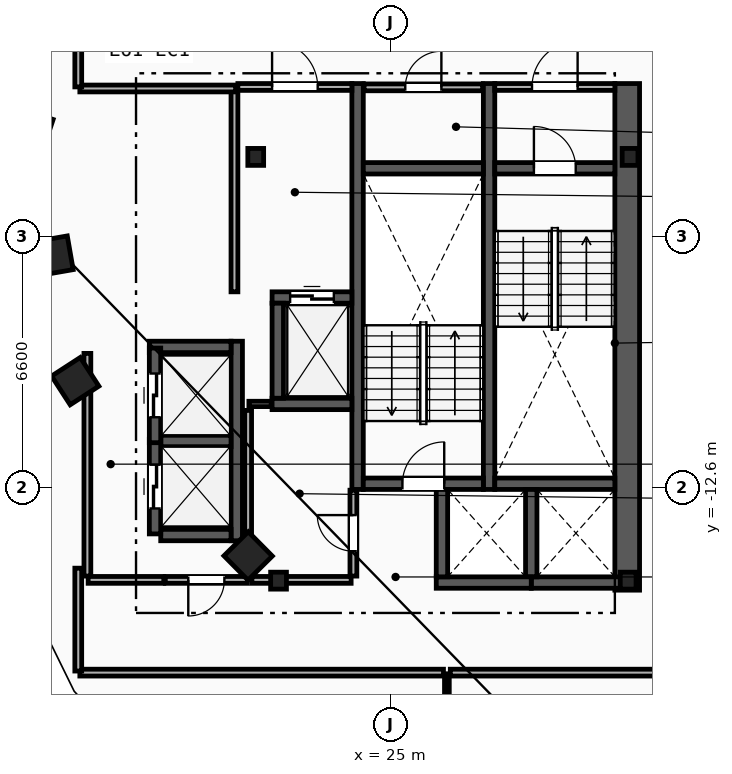
"""IFC4 building model, lengths in metres.
Left out: names, types, materials, properties, quantities, classifications, styles, units other than length and angle.
Written with IfcOpenShell. Run it as: python <this file> out.ifc"""

import sys

from ifc_helpers import new_model, si_unit, direction, frame, frame_2d, origin, origin_2d, place, context, subcontext, project, spatial, rectangle, i_section, extrude, element, fill, save


model = new_model("IFC4")
c1 = context("Model", 3, precision=1e-05, world=origin(), true_north=direction((0.0, 1.0)))
c2 = subcontext(c1, "Body", "Model", "MODEL_VIEW")
j1 = project(units=[si_unit("LENGTHUNIT", "METRE"), si_unit("PLANEANGLEUNIT", "RADIAN")], contexts=[c1])
p1 = place(None, origin())
s1 = spatial("IfcSite", under=j1, at=p1, CompositionType="ELEMENT")
p2 = place(p1, origin())
s2 = spatial("IfcBuilding", under=s1, at=p2, CompositionType="ELEMENT")
p3 = place(p2, frame((0.0, 0.0, 231.4)))
s3 = spatial("IfcBuildingStorey", under=s2, at=p3, CompositionType="ELEMENT", Elevation=231.4)
for number, where, z_axis, x_axis in (
    (1, (31.3, -3.9, 0.0), (0.0, 0.0, 1.0), (1.0, 0.0, 0.0)),
    (2, (21.45, -3.9, 0.0), (0.0, 0.0, 1.0), (1.0, 0.0, 0.0)),
    (3, (22.05, -15.05, 0.0), (0.0, 0.0, 1.0), (1.0, 0.0, 0.0)),
    (4, (31.25, -15.05, 0.0), (0.0, 0.0, 1.0), (1.0, 0.0, 0.0)),
):
    element("IfcColumn", number, at=place(p3, frame(where, z_axis=z_axis, x_axis=x_axis)), inside=s3, PredefinedType="COLUMN", context=c2, shape_type="SweptSolid", body=[
        extrude(i_section(OverallWidth=0.416, OverallDepth=0.446, WebThickness=0.039, FlangeThickness=0.063, FilletRadius=0.018, at=origin_2d()), origin(), (0.0, 0.0, 1.0), 3.6),
    ])
for number, where, z_axis, x_axis in (
    (5, (15.55, -3.2, 0.0), (0.0, 0.0, 1.0), (-0.315, -0.949, 0.0)),
    (6, (16.125, -6.5, 0.0), (0.0, 0.0, 1.0), (0.172, -0.985, 0.0)),
    (7, (16.7, -9.8, 0.0), (0.0, 0.0, 1.0), (0.544, -0.839, 0.0)),
    (8, (21.25, -14.4, 0.0), (0.0, 0.0, 1.0), (0.703, -0.711, 0.0)),
):
    element("IfcColumn", number, at=place(p3, frame(where, z_axis=z_axis, x_axis=x_axis)), inside=s3, PredefinedType="COLUMN", context=c2, shape_type="SweptSolid", body=[
        extrude(rectangle(XDim=0.9, YDim=0.9, at=origin_2d()), origin(), (0.0, 0.0, 1.0), 3.6),
    ])
p4 = place(p3, frame((31.225, -15.3, 0.0), z_axis=(0.0, 0.0, 1.0), x_axis=(0.0, 1.0, 0.0)))
e9 = element("IfcWall", 9, at=p4, inside=s3, PredefinedType="SHEAR", context=c2, shape_type="SweptSolid", body=[
    extrude(rectangle(XDim=13.33, YDim=0.65, at=frame_2d((6.665, 0.0))), origin(), (0.0, 0.0, 1.0), 3.32),
])
for number, where, z_axis, x_axis in (
    (10, (27.59, -12.65, 0.0), (0.0, 0.0, 1.0), (0.0, 1.0, 0.0)),
    (11, (24.13, -12.65, 0.0), (0.0, 0.0, 1.0), (0.0, 1.0, 0.0)),
):
    element("IfcWall", number, at=place(p3, frame(where, z_axis=z_axis, x_axis=x_axis)), inside=s3, PredefinedType="SHEAR", context=c2, shape_type="SweptSolid", body=[
        extrude(rectangle(XDim=10.68, YDim=0.3, at=frame_2d((5.34, 0.0))), origin(), (0.0, 0.0, 1.0), 3.32),
    ])
p5 = place(p3, frame((27.74, -4.2, 0.0), z_axis=(0.0, 0.0, 1.0), x_axis=(1.0, 0.0, 0.0)))
e12 = element("IfcWall", 12, at=p5, inside=s3, PredefinedType="SHEAR", context=c2, shape_type="SweptSolid", body=[
    extrude(rectangle(XDim=3.16, YDim=0.3, at=frame_2d((1.58, 0.0))), origin(), (0.0, 0.0, 1.0), 3.32),
])
p6 = place(p5, frame((1.03, 0.0, 0.0)))
e13 = element("IfcOpeningElement", 13, at=p6, cuts=e12, PredefinedType="OPENING", context=c2, shape_type="SweptSolid", body=[
    extrude(rectangle(XDim=1.1, YDim=2.15, at=frame_2d((0.55, 1.075))), frame((0.0, 0.16, 0.0), z_axis=(0.0, -1.0, 0.0), x_axis=(1.0, 0.0, 0.0)), (0.0, 0.0, 1.0), 0.32),
])
p7 = place(p3, frame((27.74, -12.5, 0.0), z_axis=(0.0, 0.0, 1.0), x_axis=(1.0, 0.0, 0.0)))
e14 = element("IfcWall", 14, at=p7, inside=s3, PredefinedType="SHEAR", context=c2, shape_type="SweptSolid", body=[
    extrude(rectangle(XDim=3.16, YDim=0.3, at=frame_2d((1.58, 0.0))), origin(), (0.0, 0.0, 1.0), 3.32),
])
p8 = place(p3, frame((24.28, -12.5, 0.0), z_axis=(0.0, 0.0, 1.0), x_axis=(1.0, 0.0, 0.0)))
e15 = element("IfcWall", 15, at=p8, inside=s3, PredefinedType="SHEAR", context=c2, shape_type="SweptSolid", body=[
    extrude(rectangle(XDim=3.16, YDim=0.3, at=frame_2d((1.58, 0.0))), origin(), (0.0, 0.0, 1.0), 3.32),
])
p9 = place(p8, frame((1.03, 0.0, 0.0)))
e16 = element("IfcOpeningElement", 16, at=p9, cuts=e15, PredefinedType="OPENING", context=c2, shape_type="SweptSolid", body=[
    extrude(rectangle(XDim=1.1, YDim=2.15, at=frame_2d((0.55, 1.075))), frame((0.0, 0.16, 0.0), z_axis=(0.0, -1.0, 0.0), x_axis=(1.0, 0.0, 0.0)), (0.0, 0.0, 1.0), 0.32),
])
p10 = place(p3, frame((24.28, -4.2, 0.0), z_axis=(0.0, 0.0, 1.0), x_axis=(1.0, 0.0, 0.0)))
e17 = element("IfcWall", 17, at=p10, inside=s3, PredefinedType="SHEAR", context=c2, shape_type="SweptSolid", body=[
    extrude(rectangle(XDim=3.16, YDim=0.3, at=frame_2d((1.58, 0.0))), origin(), (0.0, 0.0, 1.0), 3.32),
])
p11 = place(p3, frame((20.89, -7.45, 0.0), z_axis=(0.0, 0.0, 1.0), x_axis=(0.0, 1.0, 0.0)))
e18 = element("IfcWall", 18, at=p11, inside=s3, PredefinedType="PARTITIONING", context=c2, shape_type="SweptSolid", body=[
    extrude(rectangle(XDim=5.3, YDim=0.18, at=frame_2d((2.65, 0.0))), origin(), (0.0, 0.0, 1.0), 3.32),
])
p12 = place(p3, frame((20.98, -2.06, 0.0), z_axis=(0.0, 0.0, 1.0), x_axis=(1.0, 0.0, 0.0)))
e19 = element("IfcWall", 19, at=p12, inside=s3, PredefinedType="PARTITIONING", context=c2, shape_type="SweptSolid", body=[
    extrude(rectangle(XDim=3.0, YDim=0.18, at=frame_2d((1.5, 0.0))), origin(), (0.0, 0.0, 1.0), 3.32),
])
p13 = place(p12, frame((0.9, 0.0, 0.0)))
e20 = element("IfcOpeningElement", 20, at=p13, cuts=e19, PredefinedType="OPENING", context=c2, shape_type="SweptSolid", body=[
    extrude(rectangle(XDim=1.2, YDim=2.15, at=frame_2d((0.6, 1.075))), frame((0.0, 0.1, 0.0), z_axis=(0.0, -1.0, 0.0), x_axis=(1.0, 0.0, 0.0)), (0.0, 0.0, 1.0), 0.2),
])
p14 = place(p3, frame((27.74, -2.06, 0.0), z_axis=(0.0, 0.0, 1.0), x_axis=(1.0, 0.0, 0.0)))
e21 = element("IfcWall", 21, at=p14, inside=s3, PredefinedType="PARTITIONING", context=c2, shape_type="SweptSolid", body=[
    extrude(rectangle(XDim=3.16, YDim=0.18, at=frame_2d((1.58, 0.0))), origin(), (0.0, 0.0, 1.0), 3.32),
])
p15 = place(p14, frame((0.98, 0.0, 0.0)))
e22 = element("IfcOpeningElement", 22, at=p15, cuts=e21, PredefinedType="OPENING", context=c2, shape_type="SweptSolid", body=[
    extrude(rectangle(XDim=1.2, YDim=2.15, at=frame_2d((0.6, 1.075))), frame((0.0, 0.1, 0.0), z_axis=(0.0, -1.0, 0.0), x_axis=(1.0, 0.0, 0.0)), (0.0, 0.0, 1.0), 0.2),
])
p16 = place(p3, frame((21.88, -7.6, 0.0), z_axis=(0.0, 0.0, 1.0), x_axis=(1.0, 0.0, 0.0)))
e23 = element("IfcWall", 23, at=p16, inside=s3, PredefinedType="SHEAR", context=c2, shape_type="SweptSolid", body=[
    extrude(rectangle(XDim=2.1, YDim=0.3, at=frame_2d((1.05, 0.0))), origin(), (0.0, 0.0, 1.0), 3.32),
])
p17 = place(p16, frame((0.475, 0.0, 0.0)))
e24 = element("IfcOpeningElement", 24, at=p17, cuts=e23, PredefinedType="OPENING", context=c2, shape_type="SweptSolid", body=[
    extrude(rectangle(XDim=1.15, YDim=2.2, at=frame_2d((0.575, 1.1))), frame((0.0, 0.16, 0.0), z_axis=(0.0, -1.0, 0.0), x_axis=(1.0, 0.0, 0.0)), (0.0, 0.0, 1.0), 0.32),
])
p18 = place(p3, frame((21.88, -10.4, 0.0), z_axis=(0.0, 0.0, 1.0), x_axis=(1.0, 0.0, 0.0)))
e25 = element("IfcWall", 25, at=p18, inside=s3, PredefinedType="SHEAR", context=c2, shape_type="SweptSolid", body=[
    extrude(rectangle(XDim=2.1, YDim=0.3, at=frame_2d((1.05, 0.0))), origin(), (0.0, 0.0, 1.0), 3.32),
])
for number, where, z_axis, x_axis in (
    (26, (22.03, -10.25, 0.0), (0.0, 0.0, 1.0), (0.0, 1.0, 0.0)),
    (27, (28.7, -15.1, 0.0), (0.0, 0.0, 1.0), (1.0, 0.0, 0.0)),
):
    element("IfcWall", number, at=place(p3, frame(where, z_axis=z_axis, x_axis=x_axis)), inside=s3, PredefinedType="SHEAR", context=c2, shape_type="SweptSolid", body=[
        extrude(rectangle(XDim=2.5, YDim=0.3, at=frame_2d((1.25, 0.0))), origin(), (0.0, 0.0, 1.0), 3.32),
    ])
p19 = place(p3, frame((28.7, -14.95, 0.0), z_axis=(0.0, 0.0, 1.0), x_axis=(0.0, 1.0, 0.0)))
e28 = element("IfcWall", 28, at=p19, inside=s3, PredefinedType="SHEAR", context=c2, shape_type="SweptSolid", body=[
    extrude(rectangle(XDim=2.3, YDim=0.3, at=frame_2d((1.15, 0.0))), origin(), (0.0, 0.0, 1.0), 3.32),
])
p20 = place(p3, frame((26.2, -15.1, 0.0), z_axis=(0.0, 0.0, 1.0), x_axis=(1.0, 0.0, 0.0)))
e29 = element("IfcWall", 29, at=p20, inside=s3, PredefinedType="SHEAR", context=c2, shape_type="SweptSolid", body=[
    extrude(rectangle(XDim=2.5, YDim=0.3, at=frame_2d((1.25, 0.0))), origin(), (0.0, 0.0, 1.0), 3.32),
])
p21 = place(p3, frame((26.35, -14.95, 0.0), z_axis=(0.0, 0.0, 1.0), x_axis=(0.0, 1.0, 0.0)))
e30 = element("IfcWall", 30, at=p21, inside=s3, PredefinedType="SHEAR", context=c2, shape_type="SweptSolid", body=[
    extrude(rectangle(XDim=2.3, YDim=0.3, at=frame_2d((1.15, 0.0))), origin(), (0.0, 0.0, 1.0), 3.32),
])
p22 = place(p3, frame((20.95, -14.0, 0.0), z_axis=(0.0, 0.0, 1.0), x_axis=(0.0, 1.0, 0.0)))
e31 = element("IfcWall", 31, at=p22, inside=s3, PredefinedType="SHEAR", context=c2, shape_type="SweptSolid", body=[
    extrude(rectangle(XDim=5.25, YDim=0.3, at=frame_2d((2.625, 0.0))), origin(), (0.0, 0.0, 1.0), 3.32),
])
p23 = place(p3, frame((18.95, -13.85, 0.0), z_axis=(0.0, 0.0, 1.0), x_axis=(1.0, 0.0, 0.0)))
e32 = element("IfcWall", 32, at=p23, inside=s3, PredefinedType="SHEAR", context=c2, shape_type="SweptSolid", body=[
    extrude(rectangle(XDim=1.85, YDim=0.3, at=frame_2d((0.925, 0.0))), origin(), (0.0, 0.0, 1.0), 3.32),
])
p24 = place(p3, frame((18.65, -8.9, 0.0), z_axis=(0.0, 0.0, 1.0), x_axis=(1.0, 0.0, 0.0)))
e33 = element("IfcWall", 33, at=p24, inside=s3, PredefinedType="SHEAR", context=c2, shape_type="SweptSolid", body=[
    extrude(rectangle(XDim=2.15, YDim=0.3, at=frame_2d((1.075, 0.0))), origin(), (0.0, 0.0, 1.0), 3.32),
])
p25 = place(p3, frame((18.95, -11.375, 0.0), z_axis=(0.0, 0.0, 1.0), x_axis=(1.0, 0.0, 0.0)))
e34 = element("IfcWall", 34, at=p25, inside=s3, PredefinedType="SHEAR", context=c2, shape_type="SweptSolid", body=[
    extrude(rectangle(XDim=1.85, YDim=0.3, at=frame_2d((0.925, 0.0))), origin(), (0.0, 0.0, 1.0), 3.32),
])
p26 = place(p3, frame((18.8, -13.82, 0.0), z_axis=(0.0, 0.0, 1.0), x_axis=(0.0, 1.0, 0.0)))
e35 = element("IfcWall", 35, at=p26, inside=s3, PredefinedType="SHEAR", context=c2, shape_type="SweptSolid", body=[
    extrude(rectangle(XDim=2.49, YDim=0.3, at=frame_2d((1.245, 0.0))), origin(), (0.0, 0.0, 1.0), 3.32),
])
p27 = place(p26, frame((0.67, 0.0, 0.0)))
e36 = element("IfcOpeningElement", 36, at=p27, cuts=e35, PredefinedType="OPENING", context=c2, shape_type="SweptSolid", body=[
    extrude(rectangle(XDim=1.15, YDim=2.2, at=frame_2d((0.575, 1.1))), frame((0.0, 0.16, 0.0), z_axis=(0.0, -1.0, 0.0), x_axis=(1.0, 0.0, 0.0)), (0.0, 0.0, 1.0), 0.32),
])
p28 = place(p3, frame((18.8, -11.42, 0.0), z_axis=(0.0, 0.0, 1.0), x_axis=(0.0, 1.0, 0.0)))
e37 = element("IfcWall", 37, at=p28, inside=s3, PredefinedType="SHEAR", context=c2, shape_type="SweptSolid", body=[
    extrude(rectangle(XDim=2.49, YDim=0.3, at=frame_2d((1.245, 0.0))), origin(), (0.0, 0.0, 1.0), 3.32),
])
p29 = place(p28, frame((0.67, 0.0, 0.0)))
e38 = element("IfcOpeningElement", 38, at=p29, cuts=e37, PredefinedType="OPENING", context=c2, shape_type="SweptSolid", body=[
    extrude(rectangle(XDim=1.15, YDim=2.2, at=frame_2d((0.575, 1.1))), frame((0.0, 0.16, 0.0), z_axis=(0.0, -1.0, 0.0), x_axis=(1.0, 0.0, 0.0)), (0.0, 0.0, 1.0), 0.32),
])
p30 = place(p3, frame((17.02, -14.93, 0.0), z_axis=(0.0, 0.0, 1.0), x_axis=(0.0, 1.0, 0.0)))
e39 = element("IfcWall", 39, at=p30, inside=s3, PredefinedType="PARTITIONING", context=c2, shape_type="SweptSolid", body=[
    extrude(rectangle(XDim=5.86, YDim=0.18, at=frame_2d((2.93, 0.0))), origin(), (0.0, 0.0, 1.0), 3.32),
])
p31 = place(p3, frame((17.04, -15.03, 0.0), z_axis=(0.0, 0.0, 1.0), x_axis=(1.0, 0.0, 0.0)))
e40 = element("IfcWall", 40, at=p31, inside=s3, PredefinedType="PARTITIONING", context=c2, shape_type="SweptSolid", body=[
    extrude(rectangle(XDim=1.99, YDim=0.18, at=frame_2d((0.995, 0.0))), origin(), (0.0, 0.0, 1.0), 3.32),
])
p32 = place(p3, frame((21.23, -15.03, 0.0), z_axis=(0.0, 0.0, 1.0), x_axis=(-1.0, 0.0, 0.0)))
e41 = element("IfcWall", 41, at=p32, inside=s3, PredefinedType="PARTITIONING", context=c2, shape_type="SweptSolid", body=[
    extrude(rectangle(XDim=2.16, YDim=0.18, at=frame_2d((1.08, 0.0))), origin(), (0.0, 0.0, 1.0), 3.32),
])
p33 = place(p32, frame((0.605, 0.0, 0.0)))
e42 = element("IfcOpeningElement", 42, at=p33, cuts=e41, PredefinedType="OPENING", context=c2, shape_type="SweptSolid", body=[
    extrude(rectangle(XDim=0.95, YDim=2.1, at=frame_2d((0.475, 1.05))), frame((0.0, 0.1, 0.0), z_axis=(0.0, -1.0, 0.0), x_axis=(1.0, 0.0, 0.0)), (0.0, 0.0, 1.0), 0.2),
])
p34 = place(p3, frame((21.27, -10.4, 0.0), z_axis=(0.0, 0.0, 1.0), x_axis=(1.0, 0.0, 0.0)))
e43 = element("IfcWall", 43, at=p34, inside=s3, PredefinedType="PARTITIONING", context=c2, shape_type="SweptSolid", body=[
    extrude(rectangle(XDim=0.59, YDim=0.14, at=frame_2d((0.295, 0.0))), origin(), (0.0, 0.0, 1.0), 3.32),
])
p35 = place(p3, frame((21.25, -14.93, 0.0), z_axis=(0.0, 0.0, 1.0), x_axis=(0.0, 1.0, 0.0)))
e44 = element("IfcWall", 44, at=p35, inside=s3, PredefinedType="PARTITIONING", context=c2, shape_type="SweptSolid", body=[
    extrude(rectangle(XDim=4.36, YDim=0.18, at=frame_2d((2.18, 0.0))), origin(), (0.0, 0.0, 1.0), 3.32),
])
p36 = place(p3, frame((21.35, -15.03, 0.0), z_axis=(0.0, 0.0, 1.0), x_axis=(1.0, 0.0, 0.0)))
e45 = element("IfcWall", 45, at=p36, inside=s3, PredefinedType="PARTITIONING", context=c2, shape_type="SweptSolid", body=[
    extrude(rectangle(XDim=2.61, YDim=0.18, at=frame_2d((1.305, 0.0))), origin(), (0.0, 0.0, 1.0), 2.393),
])
p37 = place(p3, frame((24.3, -2.07, 0.0), z_axis=(0.0, 0.0, 1.0), x_axis=(1.0, 0.0, 0.0)))
e46 = element("IfcWall", 46, at=p37, inside=s3, PredefinedType="PARTITIONING", context=c2, shape_type="SweptSolid", body=[
    extrude(rectangle(XDim=3.12, YDim=0.18, at=frame_2d((1.56, 0.0))), origin(), (0.0, 0.0, 1.0), 3.32),
])
p38 = place(p37, frame((1.085, 0.0, 0.0)))
e47 = element("IfcOpeningElement", 47, at=p38, cuts=e46, PredefinedType="OPENING", context=c2, shape_type="SweptSolid", body=[
    extrude(rectangle(XDim=0.95, YDim=2.1, at=frame_2d((0.475, 1.05))), frame((0.0, 0.1, 0.0), z_axis=(0.0, -1.0, 0.0), x_axis=(1.0, 0.0, 0.0)), (0.0, 0.0, 1.0), 0.2),
])
p39 = place(p3, frame((24.02, -14.93, 0.0), z_axis=(0.0, 0.0, 1.0), x_axis=(0.0, 1.0, 0.0)))
e48 = element("IfcWall", 48, at=p39, inside=s3, PredefinedType="PARTITIONING", context=c2, shape_type="SweptSolid", body=[
    extrude(rectangle(XDim=2.26, YDim=0.18, at=frame_2d((1.13, 0.0))), origin(), (0.0, 0.0, 1.0), 3.32),
])
p40 = place(p39, frame((0.655, 0.0, 0.0)))
e49 = element("IfcOpeningElement", 49, at=p40, cuts=e48, PredefinedType="OPENING", context=c2, shape_type="SweptSolid", body=[
    extrude(rectangle(XDim=0.95, YDim=2.1, at=frame_2d((0.475, 1.05))), frame((0.0, 0.1, 0.0), z_axis=(0.0, -1.0, 0.0), x_axis=(1.0, 0.0, 0.0)), (0.0, 0.0, 1.0), 0.2),
])
p41 = place(p3, frame((26.48, -24.461, 0.0), z_axis=(0.0, 0.0, 1.0), x_axis=(0.0, 1.0, 0.0)))
e50 = element("IfcWall", 50, at=p41, inside=s3, PredefinedType="PARTITIONING", context=c2, shape_type="SweptSolid", body=[
    extrude(rectangle(XDim=6.961, YDim=0.125, at=frame_2d((3.48, 0.0))), origin(), (0.0, 0.0, 1.0), 3.32),
])
p42 = place(p3, frame((16.822, -17.47, 0.0), z_axis=(0.0, 0.0, 1.0), x_axis=(1.0, 0.0, 0.0)))
e51 = element("IfcWall", 51, at=p42, inside=s3, PredefinedType="PARTITIONING", context=c2, shape_type="SweptSolid", body=[
    extrude(rectangle(XDim=9.568, YDim=0.18, at=frame_2d((4.784, 0.0))), origin(), (0.0, 0.0, 1.0), 3.32),
])
p43 = place(p3, frame((26.57, -17.47, 0.0), z_axis=(0.0, 0.0, 1.0), x_axis=(1.0, 0.0, 0.0)))
e52 = element("IfcWall", 52, at=p43, inside=s3, PredefinedType="PARTITIONING", context=c2, shape_type="SweptSolid", body=[
    extrude(rectangle(XDim=7.058, YDim=0.18, at=frame_2d((3.529, 0.0))), origin(), (0.0, 0.0, 1.0), 3.32),
])
p44 = place(p3, frame((16.822, -2.1, 0.0), z_axis=(0.0, 0.0, 1.0), x_axis=(1.0, 0.0, 0.0)))
e53 = element("IfcWall", 53, at=p44, inside=s3, PredefinedType="PARTITIONING", context=c2, shape_type="SweptSolid", body=[
    extrude(rectangle(XDim=4.098, YDim=0.18, at=frame_2d((2.049, 0.0))), origin(), (0.0, 0.0, 1.0), 3.32),
])
p45 = place(p3, frame((16.78, -14.721, 0.0), z_axis=(0.0, 0.0, 1.0), x_axis=(0.0, -1.0, 0.0)))
e54 = element("IfcWall", 54, at=p45, inside=s3, PredefinedType="PARTITIONING", context=c2, shape_type="SweptSolid", body=[
    extrude(rectangle(XDim=2.707, YDim=0.18, at=frame_2d((1.354, 0.0))), origin(), (0.0, 0.0, 1.0), 3.32),
])
p46 = place(p3, frame((16.78, 0.329, 0.0), z_axis=(0.0, 0.0, 1.0), x_axis=(0.0, -1.0, 0.0)))
e55 = element("IfcWall", 55, at=p46, inside=s3, PredefinedType="PARTITIONING", context=c2, shape_type="SweptSolid", body=[
    extrude(rectangle(XDim=2.387, YDim=0.18, at=frame_2d((1.194, 0.0))), origin(), (0.0, 0.0, 1.0), 3.32),
])
p47 = place(p6, origin())
e56 = element("IfcDoor", 56, at=p47, inside=s3, OperationType="SINGLE_SWING_LEFT", PredefinedType="DOOR", context=c2, shape_type="SweptSolid", body=[
    extrude(rectangle(XDim=1.1, YDim=2.15, at=frame_2d((0.55, 1.075))), frame((0.0, 0.025, 0.0), z_axis=(0.0, -1.0, 0.0), x_axis=(1.0, 0.0, 0.0)), (0.0, 0.0, 1.0), 0.05),
])
fill(e13, e56)
p48 = place(p9, origin())
e57 = element("IfcDoor", 57, at=p48, inside=s3, OperationType="SINGLE_SWING_RIGHT", PredefinedType="DOOR", context=c2, shape_type="SweptSolid", body=[
    extrude(rectangle(XDim=1.1, YDim=2.15, at=frame_2d((0.55, 1.075))), frame((0.0, 0.025, 0.0), z_axis=(0.0, -1.0, 0.0), x_axis=(1.0, 0.0, 0.0)), (0.0, 0.0, 1.0), 0.05),
])
fill(e16, e57)
p49 = place(p13, origin())
e58 = element("IfcDoor", 58, at=p49, inside=s3, OperationType="SINGLE_SWING_LEFT", PredefinedType="DOOR", context=c2, shape_type="SweptSolid", body=[
    extrude(rectangle(XDim=1.2, YDim=2.15, at=frame_2d((0.6, 1.075))), frame((0.0, 0.025, 0.0), z_axis=(0.0, -1.0, 0.0), x_axis=(1.0, 0.0, 0.0)), (0.0, 0.0, 1.0), 0.05),
])
fill(e20, e58)
p50 = place(p15, origin())
e59 = element("IfcDoor", 59, at=p50, inside=s3, OperationType="SINGLE_SWING_RIGHT", PredefinedType="DOOR", context=c2, shape_type="SweptSolid", body=[
    extrude(rectangle(XDim=1.2, YDim=2.15, at=frame_2d((0.6, 1.075))), frame((0.0, 0.025, 0.0), z_axis=(0.0, -1.0, 0.0), x_axis=(1.0, 0.0, 0.0)), (0.0, 0.0, 1.0), 0.05),
])
fill(e22, e59)
p51 = place(p17, origin())
e60 = element("IfcDoor", 60, at=p51, inside=s3, OperationType="SLIDING_TO_LEFT", PredefinedType="TRAPDOOR", context=c2, shape_type="SweptSolid", body=[
    extrude(rectangle(XDim=1.15, YDim=2.2, at=frame_2d((0.575, 1.1))), frame((0.0, 0.025, 0.0), z_axis=(0.0, -1.0, 0.0), x_axis=(1.0, 0.0, 0.0)), (0.0, 0.0, 1.0), 0.05),
])
fill(e24, e60)
p52 = place(p27, origin())
e61 = element("IfcDoor", 61, at=p52, inside=s3, OperationType="SLIDING_TO_LEFT", PredefinedType="TRAPDOOR", context=c2, shape_type="SweptSolid", body=[
    extrude(rectangle(XDim=1.15, YDim=2.2, at=frame_2d((0.575, 1.1))), frame((0.0, 0.025, 0.0), z_axis=(0.0, -1.0, 0.0), x_axis=(1.0, 0.0, 0.0)), (0.0, 0.0, 1.0), 0.05),
])
fill(e36, e61)
p53 = place(p29, origin())
e62 = element("IfcDoor", 62, at=p53, inside=s3, OperationType="SLIDING_TO_LEFT", PredefinedType="TRAPDOOR", context=c2, shape_type="SweptSolid", body=[
    extrude(rectangle(XDim=1.15, YDim=2.2, at=frame_2d((0.575, 1.1))), frame((0.0, 0.025, 0.0), z_axis=(0.0, -1.0, 0.0), x_axis=(1.0, 0.0, 0.0)), (0.0, 0.0, 1.0), 0.05),
])
fill(e38, e62)
p54 = place(p38, origin())
e63 = element("IfcDoor", 63, at=p54, inside=s3, OperationType="SINGLE_SWING_RIGHT", PredefinedType="DOOR", context=c2, shape_type="SweptSolid", body=[
    extrude(rectangle(XDim=0.95, YDim=2.1, at=frame_2d((0.475, 1.05))), frame((0.0, 0.025, 0.0), z_axis=(0.0, -1.0, 0.0), x_axis=(1.0, 0.0, 0.0)), (0.0, 0.0, 1.0), 0.05),
])
fill(e47, e63)
p55 = place(p40, origin())
e64 = element("IfcDoor", 64, at=p55, inside=s3, OperationType="SINGLE_SWING_RIGHT", PredefinedType="DOOR", context=c2, shape_type="SweptSolid", body=[
    extrude(rectangle(XDim=0.95, YDim=2.1, at=frame_2d((0.475, 1.05))), frame((0.0, 0.025, 0.0), z_axis=(0.0, -1.0, 0.0), x_axis=(1.0, 0.0, 0.0)), (0.0, 0.0, 1.0), 0.05),
])
fill(e49, e64)
p56 = place(p33, origin())
e65 = element("IfcDoor", 65, at=p56, inside=s3, OperationType="SINGLE_SWING_RIGHT", PredefinedType="DOOR", context=c2, shape_type="SweptSolid", body=[
    extrude(rectangle(XDim=0.95, YDim=2.1, at=frame_2d((0.475, 1.05))), frame((0.0, 0.025, 0.0), z_axis=(0.0, -1.0, 0.0), x_axis=(1.0, 0.0, 0.0)), (0.0, 0.0, 1.0), 0.05),
])
fill(e42, e65)
save(model, sys.argv[1])
